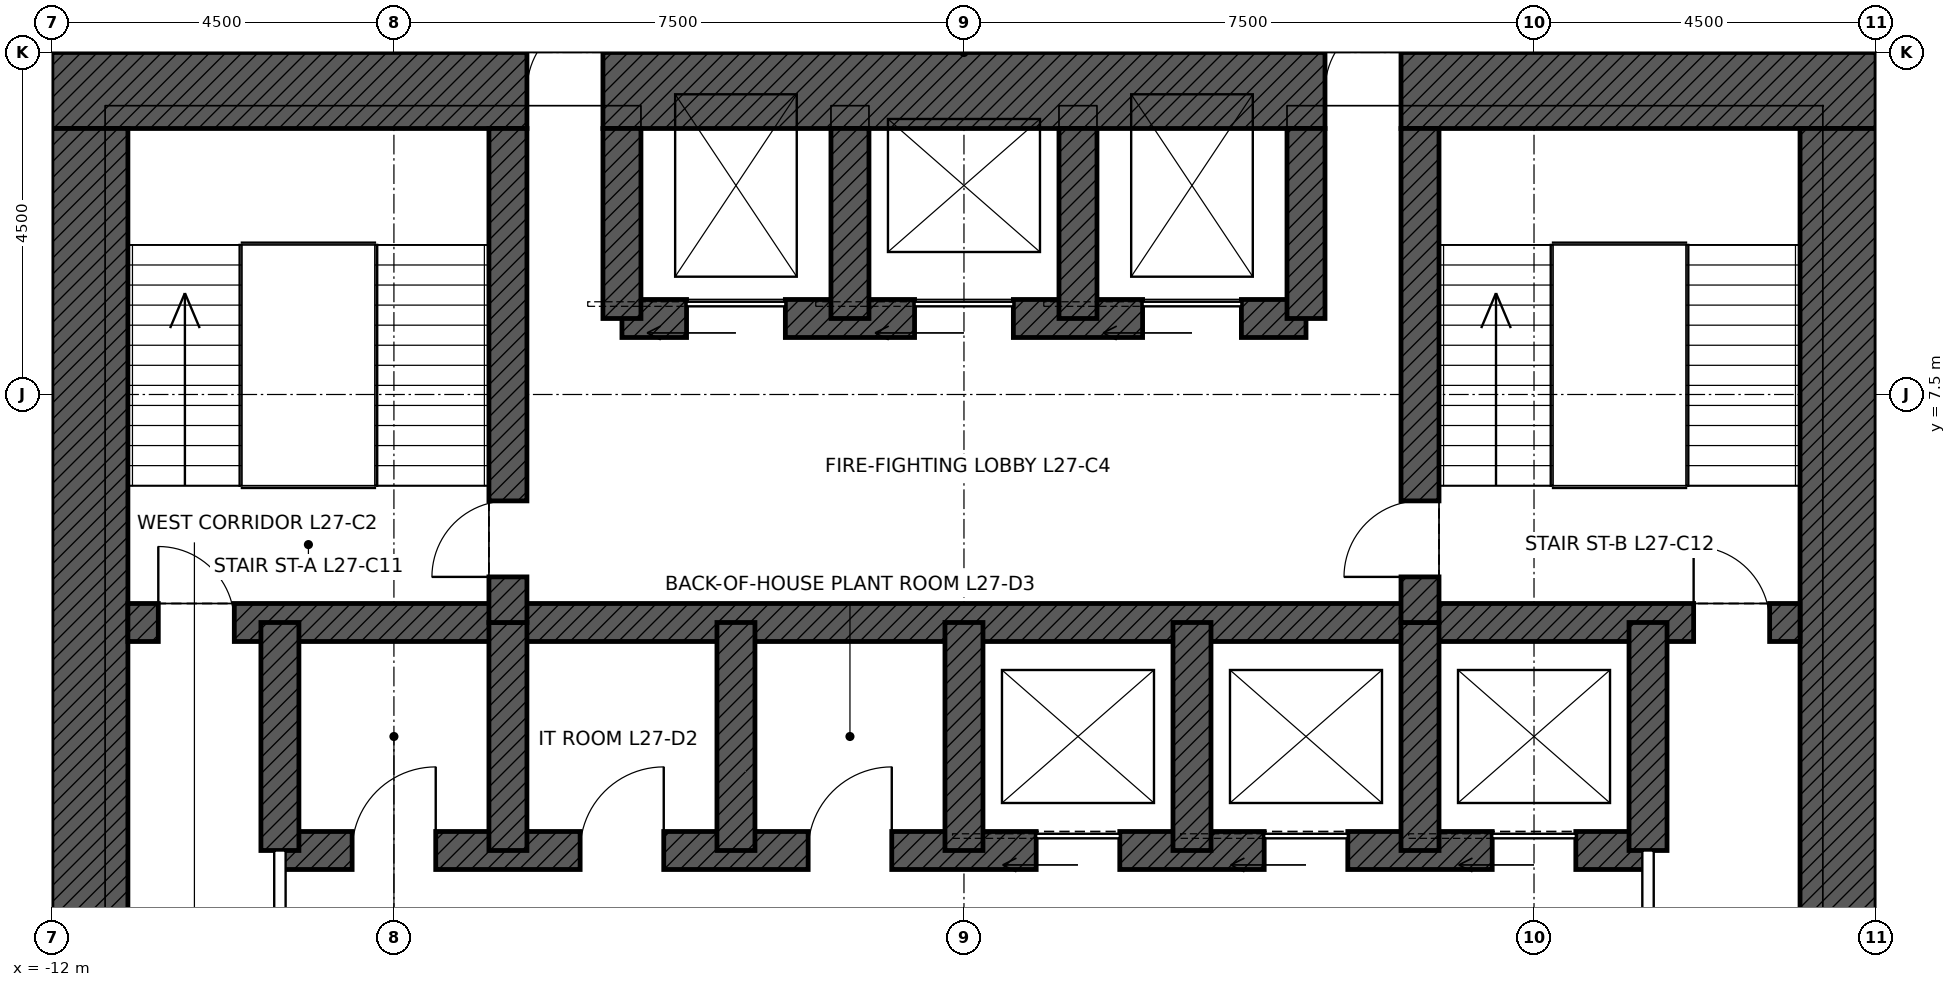
"""IFC4 building model, lengths in metres.
Left out: names, types, materials, properties, quantities, classifications, styles, units other than length and angle.
Written with IfcOpenShell. Run it as: python <this file> out.ifc"""

import sys

from ifc_helpers import new_model, si_unit, direction, frame, frame_2d, origin, place, context, subcontext, project, spatial, rectangle, extrude, element, fill, save


model = new_model("IFC4")
c1 = context("Model", 3, precision=1e-05, world=origin(), true_north=direction((0.0, 1.0)))
c2 = subcontext(c1, "Body", "Model", "MODEL_VIEW")
j1 = project(units=[si_unit("LENGTHUNIT", "METRE"), si_unit("PLANEANGLEUNIT", "RADIAN")], contexts=[c1])
p1 = place(None, origin())
s1 = spatial("IfcSite", under=j1, at=p1, CompositionType="ELEMENT")
p2 = place(p1, origin())
s2 = spatial("IfcBuilding", under=s1, at=p2, CompositionType="ELEMENT")
p3 = place(p2, frame((0.0, 0.0, 135.9)))
s3 = spatial("IfcBuildingStorey", under=s2, at=p3, CompositionType="ELEMENT", Elevation=135.9)
p4 = place(p3, frame((-12.0, 11.5, 0.0), z_axis=(0.0, 0.0, 1.0), x_axis=(1.0, 0.0, 0.0)))
e1 = element("IfcWall", 1, at=p4, inside=s3, PredefinedType="SHEAR", context=c2, shape_type="SweptSolid", body=[
    extrude(rectangle(XDim=24.0, YDim=1.0, at=frame_2d((12.0, 0.0))), origin(), (0.0, 0.0, 1.0), 4.5),
])
p5 = place(p4, frame((6.25, 0.0, 0.0)))
e2 = element("IfcOpeningElement", 2, at=p5, cuts=e1, PredefinedType="OPENING", context=c2, shape_type="SweptSolid", body=[
    extrude(rectangle(XDim=1.0, YDim=2.4, at=frame_2d((0.5, 1.2))), frame((0.0, 0.51, 0.0), z_axis=(0.0, -1.0, 0.0), x_axis=(1.0, 0.0, 0.0)), (0.0, 0.0, 1.0), 1.02),
])
p6 = place(p4, frame((16.75, 0.0, 0.0)))
e3 = element("IfcOpeningElement", 3, at=p6, cuts=e1, PredefinedType="OPENING", context=c2, shape_type="SweptSolid", body=[
    extrude(rectangle(XDim=1.0, YDim=2.4, at=frame_2d((0.5, 1.2))), frame((0.0, 0.51, 0.0), z_axis=(0.0, -1.0, 0.0), x_axis=(1.0, 0.0, 0.0)), (0.0, 0.0, 1.0), 1.02),
])
p7 = place(p3, frame((11.5, 11.0, 0.0), z_axis=(0.0, 0.0, 1.0), x_axis=(0.0, -1.0, 0.0)))
e4 = element("IfcWall", 4, at=p7, inside=s3, PredefinedType="SHEAR", context=c2, shape_type="SweptSolid", body=[
    extrude(rectangle(XDim=22.0, YDim=1.0, at=frame_2d((11.0, 0.0))), origin(), (0.0, 0.0, 1.0), 4.5),
])
p8 = place(p7, frame((10.5, 0.0, 0.0)))
e5 = element("IfcOpeningElement", 5, at=p8, cuts=e4, PredefinedType="OPENING", context=c2, shape_type="SweptSolid", body=[
    extrude(rectangle(XDim=1.0, YDim=2.4, at=frame_2d((0.5, 1.2))), frame((0.0, 0.51, 0.0), z_axis=(0.0, -1.0, 0.0), x_axis=(1.0, 0.0, 0.0)), (0.0, 0.0, 1.0), 1.02),
])
p9 = place(p3, frame((-11.5, -11.0, 0.0), z_axis=(0.0, 0.0, 1.0), x_axis=(0.0, 1.0, 0.0)))
e6 = element("IfcWall", 6, at=p9, inside=s3, PredefinedType="SHEAR", context=c2, shape_type="SweptSolid", body=[
    extrude(rectangle(XDim=22.0, YDim=1.0, at=frame_2d((11.0, 0.0))), origin(), (0.0, 0.0, 1.0), 4.5),
])
p10 = place(p9, frame((10.5, 0.0, 0.0)))
e7 = element("IfcOpeningElement", 7, at=p10, cuts=e6, PredefinedType="OPENING", context=c2, shape_type="SweptSolid", body=[
    extrude(rectangle(XDim=1.0, YDim=2.4, at=frame_2d((0.5, 1.2))), frame((0.0, 0.51, 0.0), z_axis=(0.0, -1.0, 0.0), x_axis=(1.0, 0.0, 0.0)), (0.0, 0.0, 1.0), 1.02),
])
p11 = place(p3, frame((-11.0, 4.5, 0.0), z_axis=(0.0, 0.0, 1.0), x_axis=(1.0, 0.0, 0.0)))
e8 = element("IfcWall", 8, at=p11, inside=s3, PredefinedType="SHEAR", context=c2, shape_type="SweptSolid", body=[
    extrude(rectangle(XDim=22.0, YDim=0.5, at=frame_2d((11.0, 0.0))), origin(), (0.0, 0.0, 1.0), 4.5),
])
p12 = place(p11, frame((0.4, 0.0, 0.0)))
e9 = element("IfcOpeningElement", 9, at=p12, cuts=e8, PredefinedType="OPENING", context=c2, shape_type="SweptSolid", body=[
    extrude(rectangle(XDim=1.0, YDim=2.1, at=frame_2d((0.5, 1.05))), frame((0.0, 0.26, 0.0), z_axis=(0.0, -1.0, 0.0), x_axis=(1.0, 0.0, 0.0)), (0.0, 0.0, 1.0), 0.52),
])
p13 = place(p11, frame((20.6, 0.0, 0.0)))
e10 = element("IfcOpeningElement", 10, at=p13, cuts=e8, PredefinedType="OPENING", context=c2, shape_type="SweptSolid", body=[
    extrude(rectangle(XDim=1.0, YDim=2.1, at=frame_2d((0.5, 1.05))), frame((0.0, 0.26, 0.0), z_axis=(0.0, -1.0, 0.0), x_axis=(1.0, 0.0, 0.0)), (0.0, 0.0, 1.0), 0.52),
])
p14 = place(p3, frame((-9.0, 1.5, 0.0), z_axis=(0.0, 0.0, 1.0), x_axis=(1.0, 0.0, 0.0)))
e11 = element("IfcWall", 11, at=p14, inside=s3, PredefinedType="SHEAR", context=c2, shape_type="SweptSolid", body=[
    extrude(rectangle(XDim=18.0, YDim=0.5, at=frame_2d((9.0, 0.0))), origin(), (0.0, 0.0, 1.0), 4.5),
])
p15 = place(p14, frame((9.95, 0.0, 0.0)))
e12 = element("IfcOpeningElement", 12, at=p15, cuts=e11, PredefinedType="OPENING", context=c2, shape_type="SweptSolid", body=[
    extrude(rectangle(XDim=1.1, YDim=2.1, at=frame_2d((0.55, 1.05))), frame((0.0, 0.26, 0.0), z_axis=(0.0, -1.0, 0.0), x_axis=(1.0, 0.0, 0.0)), (0.0, 0.0, 1.0), 0.52),
])
p16 = place(p14, frame((12.95, 0.0, 0.0)))
e13 = element("IfcOpeningElement", 13, at=p16, cuts=e11, PredefinedType="OPENING", context=c2, shape_type="SweptSolid", body=[
    extrude(rectangle(XDim=1.1, YDim=2.1, at=frame_2d((0.55, 1.05))), frame((0.0, 0.26, 0.0), z_axis=(0.0, -1.0, 0.0), x_axis=(1.0, 0.0, 0.0)), (0.0, 0.0, 1.0), 0.52),
])
p17 = place(p14, frame((15.95, 0.0, 0.0)))
e14 = element("IfcOpeningElement", 14, at=p17, cuts=e11, PredefinedType="OPENING", context=c2, shape_type="SweptSolid", body=[
    extrude(rectangle(XDim=1.1, YDim=2.1, at=frame_2d((0.55, 1.05))), frame((0.0, 0.26, 0.0), z_axis=(0.0, -1.0, 0.0), x_axis=(1.0, 0.0, 0.0)), (0.0, 0.0, 1.0), 0.52),
])
p18 = place(p14, frame((0.95, 0.0, 0.0)))
e15 = element("IfcOpeningElement", 15, at=p18, cuts=e11, PredefinedType="OPENING", context=c2, shape_type="SweptSolid", body=[
    extrude(rectangle(XDim=1.1, YDim=2.1, at=frame_2d((0.55, 1.05))), frame((0.0, 0.26, 0.0), z_axis=(0.0, -1.0, 0.0), x_axis=(1.0, 0.0, 0.0)), (0.0, 0.0, 1.0), 0.52),
])
p19 = place(p14, frame((3.95, 0.0, 0.0)))
e16 = element("IfcOpeningElement", 16, at=p19, cuts=e11, PredefinedType="OPENING", context=c2, shape_type="SweptSolid", body=[
    extrude(rectangle(XDim=1.1, YDim=2.1, at=frame_2d((0.55, 1.05))), frame((0.0, 0.26, 0.0), z_axis=(0.0, -1.0, 0.0), x_axis=(1.0, 0.0, 0.0)), (0.0, 0.0, 1.0), 0.52),
])
p20 = place(p14, frame((6.95, 0.0, 0.0)))
e17 = element("IfcOpeningElement", 17, at=p20, cuts=e11, PredefinedType="OPENING", context=c2, shape_type="SweptSolid", body=[
    extrude(rectangle(XDim=1.1, YDim=2.1, at=frame_2d((0.55, 1.05))), frame((0.0, 0.26, 0.0), z_axis=(0.0, -1.0, 0.0), x_axis=(1.0, 0.0, 0.0)), (0.0, 0.0, 1.0), 0.52),
])
p21 = place(p3, frame((-4.5, 8.5, 0.0), z_axis=(0.0, 0.0, 1.0), x_axis=(1.0, 0.0, 0.0)))
e18 = element("IfcWall", 18, at=p21, inside=s3, PredefinedType="SHEAR", context=c2, shape_type="SweptSolid", body=[
    extrude(rectangle(XDim=9.0, YDim=0.5, at=frame_2d((4.5, 0.0))), origin(), (0.0, 0.0, 1.0), 4.5),
])
p22 = place(p21, frame((0.85, 0.0, 0.0)))
e19 = element("IfcOpeningElement", 19, at=p22, cuts=e18, PredefinedType="OPENING", context=c2, shape_type="SweptSolid", body=[
    extrude(rectangle(XDim=1.3, YDim=2.4, at=frame_2d((0.65, 1.2))), frame((0.0, 0.26, 0.0), z_axis=(0.0, -1.0, 0.0), x_axis=(1.0, 0.0, 0.0)), (0.0, 0.0, 1.0), 0.52),
])
p23 = place(p21, frame((6.85, 0.0, 0.0)))
e20 = element("IfcOpeningElement", 20, at=p23, cuts=e18, PredefinedType="OPENING", context=c2, shape_type="SweptSolid", body=[
    extrude(rectangle(XDim=1.3, YDim=2.4, at=frame_2d((0.65, 1.2))), frame((0.0, 0.26, 0.0), z_axis=(0.0, -1.0, 0.0), x_axis=(1.0, 0.0, 0.0)), (0.0, 0.0, 1.0), 0.52),
])
p24 = place(p21, frame((3.85, 0.0, 0.0)))
e21 = element("IfcOpeningElement", 21, at=p24, cuts=e18, PredefinedType="OPENING", context=c2, shape_type="SweptSolid", body=[
    extrude(rectangle(XDim=1.3, YDim=2.4, at=frame_2d((0.65, 1.2))), frame((0.0, 0.26, 0.0), z_axis=(0.0, -1.0, 0.0), x_axis=(1.0, 0.0, 0.0)), (0.0, 0.0, 1.0), 0.52),
])
for number, where, z_axis, x_axis in (
    (22, (-9.0, 1.5, 0.0), (0.0, 0.0, 1.0), (0.0, 1.0, 0.0)),
    (23, (9.0, 1.5, 0.0), (0.0, 0.0, 1.0), (0.0, 1.0, 0.0)),
    (24, (-6.0, 1.5, 0.0), (0.0, 0.0, 1.0), (0.0, 1.0, 0.0)),
    (25, (-3.0, 1.5, 0.0), (0.0, 0.0, 1.0), (0.0, 1.0, 0.0)),
    (26, (0.0, 1.5, 0.0), (0.0, 0.0, 1.0), (0.0, 1.0, 0.0)),
    (27, (3.0, 1.5, 0.0), (0.0, 0.0, 1.0), (0.0, 1.0, 0.0)),
    (28, (6.0, 1.5, 0.0), (0.0, 0.0, 1.0), (0.0, 1.0, 0.0)),
):
    element("IfcWall", number, at=place(p3, frame(where, z_axis=z_axis, x_axis=x_axis)), inside=s3, PredefinedType="SHEAR", context=c2, shape_type="SweptSolid", body=[
        extrude(rectangle(XDim=3.0, YDim=0.5, at=frame_2d((1.5, 0.0))), origin(), (0.0, 0.0, 1.0), 4.5),
    ])
p25 = place(p3, frame((-6.0, 4.5, 0.0), z_axis=(0.0, 0.0, 1.0), x_axis=(0.0, 1.0, 0.0)))
e29 = element("IfcWall", 29, at=p25, inside=s3, PredefinedType="SHEAR", context=c2, shape_type="SweptSolid", body=[
    extrude(rectangle(XDim=6.5, YDim=0.5, at=frame_2d((3.25, 0.0))), origin(), (0.0, 0.0, 1.0), 4.5),
])
p26 = place(p25, frame((0.6, 0.0, 0.0)))
e30 = element("IfcOpeningElement", 30, at=p26, cuts=e29, PredefinedType="OPENING", context=c2, shape_type="SweptSolid", body=[
    extrude(rectangle(XDim=1.0, YDim=2.1, at=frame_2d((0.5, 1.05))), frame((0.0, 0.26, 0.0), z_axis=(0.0, -1.0, 0.0), x_axis=(1.0, 0.0, 0.0)), (0.0, 0.0, 1.0), 0.52),
])
p27 = place(p3, frame((6.0, 4.5, 0.0), z_axis=(0.0, 0.0, 1.0), x_axis=(0.0, 1.0, 0.0)))
e31 = element("IfcWall", 31, at=p27, inside=s3, PredefinedType="SHEAR", context=c2, shape_type="SweptSolid", body=[
    extrude(rectangle(XDim=6.5, YDim=0.5, at=frame_2d((3.25, 0.0))), origin(), (0.0, 0.0, 1.0), 4.5),
])
p28 = place(p27, frame((0.6, 0.0, 0.0)))
e32 = element("IfcOpeningElement", 32, at=p28, cuts=e31, PredefinedType="OPENING", context=c2, shape_type="SweptSolid", body=[
    extrude(rectangle(XDim=1.0, YDim=2.1, at=frame_2d((0.5, 1.05))), frame((0.0, 0.26, 0.0), z_axis=(0.0, -1.0, 0.0), x_axis=(1.0, 0.0, 0.0)), (0.0, 0.0, 1.0), 0.52),
])
for number, where, z_axis, x_axis in (
    (33, (-4.5, 8.5, 0.0), (0.0, 0.0, 1.0), (0.0, 1.0, 0.0)),
    (34, (4.5, 8.5, 0.0), (0.0, 0.0, 1.0), (0.0, 1.0, 0.0)),
    (35, (-1.5, 8.5, 0.0), (0.0, 0.0, 1.0), (0.0, 1.0, 0.0)),
    (36, (1.5, 8.5, 0.0), (0.0, 0.0, 1.0), (0.0, 1.0, 0.0)),
):
    element("IfcWall", number, at=place(p3, frame(where, z_axis=z_axis, x_axis=x_axis)), inside=s3, PredefinedType="SHEAR", context=c2, shape_type="SweptSolid", body=[
        extrude(rectangle(XDim=2.5, YDim=0.5, at=frame_2d((1.25, 0.0))), origin(), (0.0, 0.0, 1.0), 4.5),
    ])
p29 = place(p3, frame((-9.0, -1.5, 0.0), z_axis=(0.0, 0.0, 1.0), x_axis=(0.0, 1.0, 0.0)))
e37 = element("IfcWall", 37, at=p29, inside=s3, PredefinedType="PARTITIONING", context=c2, shape_type="SweptSolid", body=[
    extrude(rectangle(XDim=3.0, YDim=0.15, at=frame_2d((1.5, 0.0))), origin(), (0.0, 0.0, 1.0), 4.25),
])
p30 = place(p29, frame((1.0, 0.0, 0.0)))
e38 = element("IfcOpeningElement", 38, at=p30, cuts=e37, PredefinedType="OPENING", context=c2, shape_type="SweptSolid", body=[
    extrude(rectangle(XDim=1.0, YDim=2.4, at=frame_2d((0.5, 1.2))), frame((0.0, 0.085, 0.0), z_axis=(0.0, -1.0, 0.0), x_axis=(1.0, 0.0, 0.0)), (0.0, 0.0, 1.0), 0.17),
])
p31 = place(p3, frame((9.0, -1.5, 0.0), z_axis=(0.0, 0.0, 1.0), x_axis=(0.0, 1.0, 0.0)))
e39 = element("IfcWall", 39, at=p31, inside=s3, PredefinedType="PARTITIONING", context=c2, shape_type="SweptSolid", body=[
    extrude(rectangle(XDim=3.0, YDim=0.15, at=frame_2d((1.5, 0.0))), origin(), (0.0, 0.0, 1.0), 4.25),
])
p32 = place(p31, frame((1.0, 0.0, 0.0)))
e40 = element("IfcOpeningElement", 40, at=p32, cuts=e39, PredefinedType="OPENING", context=c2, shape_type="SweptSolid", body=[
    extrude(rectangle(XDim=1.0, YDim=2.4, at=frame_2d((0.5, 1.2))), frame((0.0, 0.085, 0.0), z_axis=(0.0, -1.0, 0.0), x_axis=(1.0, 0.0, 0.0)), (0.0, 0.0, 1.0), 0.17),
])
p33 = place(p12, origin())
e41 = element("IfcDoor", 41, at=p33, inside=s3, OperationType="SINGLE_SWING_LEFT", PredefinedType="DOOR", context=c2, shape_type="SweptSolid", body=[
    extrude(rectangle(XDim=1.0, YDim=2.1, at=frame_2d((0.5, 1.05))), frame((0.0, 0.025, 0.0), z_axis=(0.0, -1.0, 0.0), x_axis=(1.0, 0.0, 0.0)), (0.0, 0.0, 1.0), 0.05),
])
fill(e9, e41)
p34 = place(p13, origin())
e42 = element("IfcDoor", 42, at=p34, inside=s3, OperationType="SINGLE_SWING_LEFT", PredefinedType="DOOR", context=c2, shape_type="SweptSolid", body=[
    extrude(rectangle(XDim=1.0, YDim=2.1, at=frame_2d((0.5, 1.05))), frame((0.0, 0.025, 0.0), z_axis=(0.0, -1.0, 0.0), x_axis=(1.0, 0.0, 0.0)), (0.0, 0.0, 1.0), 0.05),
])
fill(e10, e42)
p35 = place(p26, origin())
e43 = element("IfcDoor", 43, at=p35, inside=s3, OperationType="SINGLE_SWING_LEFT", PredefinedType="DOOR", context=c2, shape_type="SweptSolid", body=[
    extrude(rectangle(XDim=1.0, YDim=2.1, at=frame_2d((0.5, 1.05))), frame((0.0, 0.025, 0.0), z_axis=(0.0, -1.0, 0.0), x_axis=(1.0, 0.0, 0.0)), (0.0, 0.0, 1.0), 0.05),
])
fill(e30, e43)
p36 = place(p28, origin())
e44 = element("IfcDoor", 44, at=p36, inside=s3, OperationType="SINGLE_SWING_LEFT", PredefinedType="DOOR", context=c2, shape_type="SweptSolid", body=[
    extrude(rectangle(XDim=1.0, YDim=2.1, at=frame_2d((0.5, 1.05))), frame((0.0, 0.025, 0.0), z_axis=(0.0, -1.0, 0.0), x_axis=(1.0, 0.0, 0.0)), (0.0, 0.0, 1.0), 0.05),
])
fill(e32, e44)
p37 = place(p5, origin())
e45 = element("IfcDoor", 45, at=p37, inside=s3, OperationType="SINGLE_SWING_RIGHT", PredefinedType="DOOR", context=c2, shape_type="SweptSolid", body=[
    extrude(rectangle(XDim=1.0, YDim=2.4, at=frame_2d((0.5, 1.2))), frame((0.0, 0.485, 0.0), z_axis=(0.0, -1.0, 0.0), x_axis=(1.0, 0.0, 0.0)), (0.0, 0.0, 1.0), 0.05),
])
fill(e2, e45)
p38 = place(p6, origin())
e46 = element("IfcDoor", 46, at=p38, inside=s3, OperationType="SINGLE_SWING_RIGHT", PredefinedType="DOOR", context=c2, shape_type="SweptSolid", body=[
    extrude(rectangle(XDim=1.0, YDim=2.4, at=frame_2d((0.5, 1.2))), frame((0.0, 0.485, 0.0), z_axis=(0.0, -1.0, 0.0), x_axis=(1.0, 0.0, 0.0)), (0.0, 0.0, 1.0), 0.05),
])
fill(e3, e46)
p39 = place(p22, origin())
e47 = element("IfcDoor", 47, at=p39, inside=s3, OperationType="SLIDING_TO_LEFT", PredefinedType="DOOR", context=c2, shape_type="SweptSolid", body=[
    extrude(rectangle(XDim=1.3, YDim=2.4, at=frame_2d((0.65, 1.2))), frame((0.0, 0.025, 0.0), z_axis=(0.0, -1.0, 0.0), x_axis=(1.0, 0.0, 0.0)), (0.0, 0.0, 1.0), 0.05),
])
fill(e19, e47)
p40 = place(p23, origin())
e48 = element("IfcDoor", 48, at=p40, inside=s3, OperationType="SLIDING_TO_LEFT", PredefinedType="DOOR", context=c2, shape_type="SweptSolid", body=[
    extrude(rectangle(XDim=1.3, YDim=2.4, at=frame_2d((0.65, 1.2))), frame((0.0, 0.025, 0.0), z_axis=(0.0, -1.0, 0.0), x_axis=(1.0, 0.0, 0.0)), (0.0, 0.0, 1.0), 0.05),
])
fill(e20, e48)
p41 = place(p24, origin())
e49 = element("IfcDoor", 49, at=p41, inside=s3, OperationType="SLIDING_TO_LEFT", PredefinedType="DOOR", context=c2, shape_type="SweptSolid", body=[
    extrude(rectangle(XDim=1.3, YDim=2.4, at=frame_2d((0.65, 1.2))), frame((0.0, 0.025, 0.0), z_axis=(0.0, -1.0, 0.0), x_axis=(1.0, 0.0, 0.0)), (0.0, 0.0, 1.0), 0.05),
])
fill(e21, e49)
p42 = place(p15, origin())
e50 = element("IfcDoor", 50, at=p42, inside=s3, OperationType="SLIDING_TO_LEFT", PredefinedType="DOOR", context=c2, shape_type="SweptSolid", body=[
    extrude(rectangle(XDim=1.1, YDim=2.1, at=frame_2d((0.55, 1.05))), frame((0.0, 0.025, 0.0), z_axis=(0.0, -1.0, 0.0), x_axis=(1.0, 0.0, 0.0)), (0.0, 0.0, 1.0), 0.05),
])
fill(e12, e50)
p43 = place(p16, origin())
e51 = element("IfcDoor", 51, at=p43, inside=s3, OperationType="SLIDING_TO_LEFT", PredefinedType="DOOR", context=c2, shape_type="SweptSolid", body=[
    extrude(rectangle(XDim=1.1, YDim=2.1, at=frame_2d((0.55, 1.05))), frame((0.0, 0.025, 0.0), z_axis=(0.0, -1.0, 0.0), x_axis=(1.0, 0.0, 0.0)), (0.0, 0.0, 1.0), 0.05),
])
fill(e13, e51)
p44 = place(p17, origin())
e52 = element("IfcDoor", 52, at=p44, inside=s3, OperationType="SLIDING_TO_LEFT", PredefinedType="DOOR", context=c2, shape_type="SweptSolid", body=[
    extrude(rectangle(XDim=1.1, YDim=2.1, at=frame_2d((0.55, 1.05))), frame((0.0, 0.025, 0.0), z_axis=(0.0, -1.0, 0.0), x_axis=(1.0, 0.0, 0.0)), (0.0, 0.0, 1.0), 0.05),
])
fill(e14, e52)
p45 = place(p18, origin())
e53 = element("IfcDoor", 53, at=p45, inside=s3, OperationType="SINGLE_SWING_RIGHT", PredefinedType="DOOR", context=c2, shape_type="SweptSolid", body=[
    extrude(rectangle(XDim=1.1, YDim=2.1, at=frame_2d((0.55, 1.05))), frame((0.0, 0.025, 0.0), z_axis=(0.0, -1.0, 0.0), x_axis=(1.0, 0.0, 0.0)), (0.0, 0.0, 1.0), 0.05),
])
fill(e15, e53)
p46 = place(p19, origin())
e54 = element("IfcDoor", 54, at=p46, inside=s3, OperationType="SINGLE_SWING_RIGHT", PredefinedType="DOOR", context=c2, shape_type="SweptSolid", body=[
    extrude(rectangle(XDim=1.1, YDim=2.1, at=frame_2d((0.55, 1.05))), frame((0.0, 0.025, 0.0), z_axis=(0.0, -1.0, 0.0), x_axis=(1.0, 0.0, 0.0)), (0.0, 0.0, 1.0), 0.05),
])
fill(e16, e54)
p47 = place(p20, origin())
e55 = element("IfcDoor", 55, at=p47, inside=s3, OperationType="SINGLE_SWING_RIGHT", PredefinedType="DOOR", context=c2, shape_type="SweptSolid", body=[
    extrude(rectangle(XDim=1.1, YDim=2.1, at=frame_2d((0.55, 1.05))), frame((0.0, 0.025, 0.0), z_axis=(0.0, -1.0, 0.0), x_axis=(1.0, 0.0, 0.0)), (0.0, 0.0, 1.0), 0.05),
])
fill(e17, e55)
save(model, sys.argv[1])
